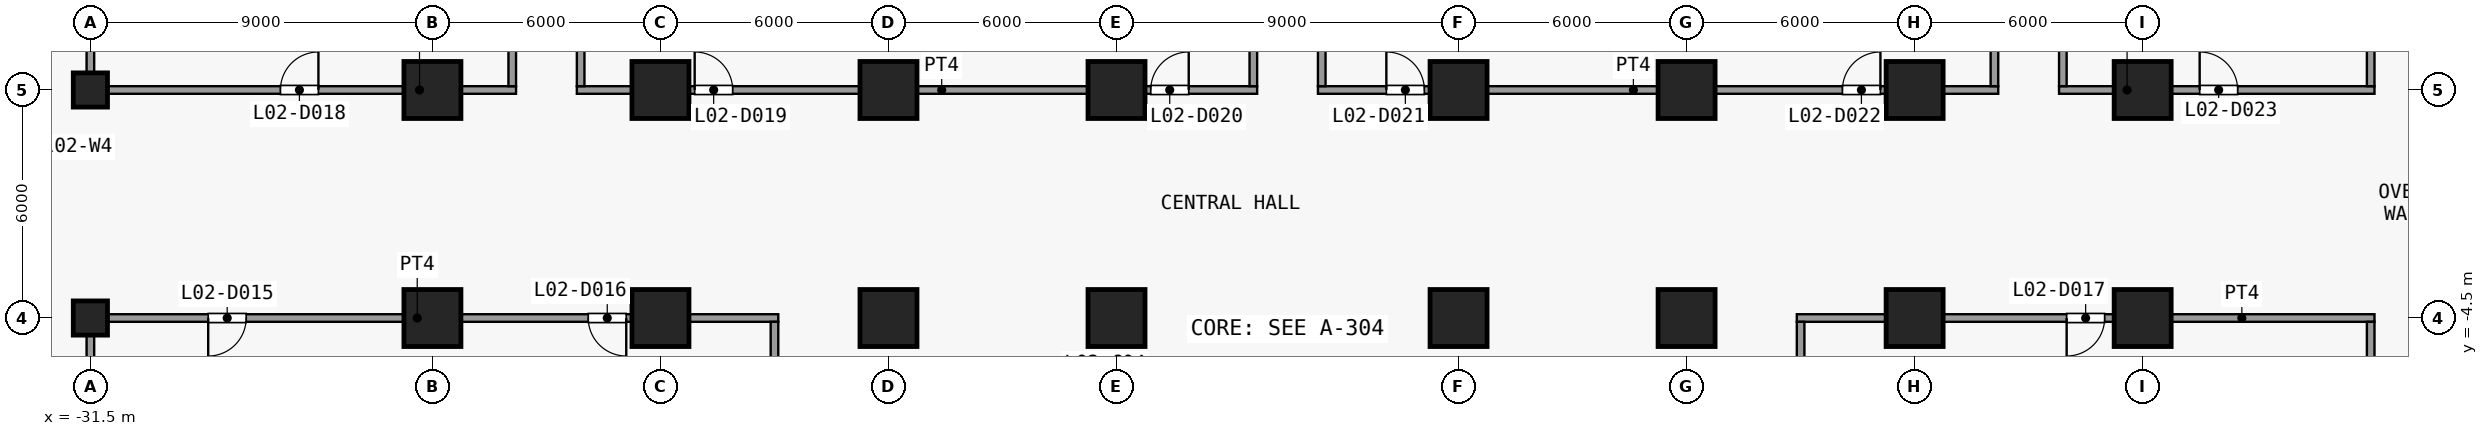
"""IFC4 building model, lengths in metres.
Left out: names, types, materials, properties, quantities, classifications, styles, units other than length and angle.
Written with IfcOpenShell. Run it as: python <this file> out.ifc"""

import sys

from ifc_helpers import new_model, si_unit, direction, frame, frame_2d, origin, origin_2d, place, context, subcontext, project, spatial, rectangle, extrude, element, fill, save


model = new_model("IFC4")
c1 = context("Model", 3, precision=1e-05, world=origin(), true_north=direction((0.0, 1.0)))
c2 = subcontext(c1, "Body", "Model", "MODEL_VIEW")
j1 = project(units=[si_unit("LENGTHUNIT", "METRE"), si_unit("PLANEANGLEUNIT", "RADIAN")], contexts=[c1])
p1 = place(None, origin())
s1 = spatial("IfcSite", under=j1, at=p1, CompositionType="ELEMENT")
p2 = place(p1, origin())
s2 = spatial("IfcBuilding", under=s1, at=p2, CompositionType="ELEMENT")
p3 = place(p2, frame((0.0, 0.0, 13.5)))
s3 = spatial("IfcBuildingStorey", under=s2, at=p3, CompositionType="ELEMENT", Elevation=13.5)
for number, where, z_axis, x_axis in (
    (1, (-31.5, -4.5, 0.0), (0.0, 0.0, 1.0), (1.0, 0.0, 0.0)),
    (2, (-31.5, 1.5, 0.0), (0.0, 0.0, 1.0), (1.0, 0.0, 0.0)),
):
    element("IfcColumn", number, at=place(p3, frame(where, z_axis=z_axis, x_axis=x_axis)), inside=s3, PredefinedType="COLUMN", context=c2, shape_type="SweptSolid", body=[
        extrude(rectangle(XDim=0.9, YDim=0.9, at=origin_2d()), origin(), (0.0, 0.0, 1.0), 5.0),
    ])
for number, where, z_axis, x_axis in (
    (3, (-22.5, -4.5, 0.0), (0.0, 0.0, 1.0), (1.0, 0.0, 0.0)),
    (4, (-22.5, 1.5, 0.0), (0.0, 0.0, 1.0), (1.0, 0.0, 0.0)),
    (5, (-16.5, -4.5, 0.0), (0.0, 0.0, 1.0), (1.0, 0.0, 0.0)),
    (6, (-16.5, 1.5, 0.0), (0.0, 0.0, 1.0), (1.0, 0.0, 0.0)),
    (7, (-10.5, -4.5, 0.0), (0.0, 0.0, 1.0), (1.0, 0.0, 0.0)),
    (8, (-10.5, 1.5, 0.0), (0.0, 0.0, 1.0), (1.0, 0.0, 0.0)),
    (9, (-4.5, -4.5, 0.0), (0.0, 0.0, 1.0), (1.0, 0.0, 0.0)),
    (10, (-4.5, 1.5, 0.0), (0.0, 0.0, 1.0), (1.0, 0.0, 0.0)),
    (11, (4.5, -4.5, 0.0), (0.0, 0.0, 1.0), (1.0, 0.0, 0.0)),
    (12, (4.5, 1.5, 0.0), (0.0, 0.0, 1.0), (1.0, 0.0, 0.0)),
    (13, (10.5, -4.5, 0.0), (0.0, 0.0, 1.0), (1.0, 0.0, 0.0)),
    (14, (10.5, 1.5, 0.0), (0.0, 0.0, 1.0), (1.0, 0.0, 0.0)),
    (15, (16.5, -4.5, 0.0), (0.0, 0.0, 1.0), (1.0, 0.0, 0.0)),
    (16, (16.5, 1.5, 0.0), (0.0, 0.0, 1.0), (1.0, 0.0, 0.0)),
    (17, (22.5, -4.5, 0.0), (0.0, 0.0, 1.0), (1.0, 0.0, 0.0)),
    (18, (22.5, 1.5, 0.0), (0.0, 0.0, 1.0), (1.0, 0.0, 0.0)),
):
    element("IfcColumn", number, at=place(p3, frame(where, z_axis=z_axis, x_axis=x_axis)), inside=s3, PredefinedType="COLUMN", context=c2, shape_type="SweptSolid", body=[
        extrude(rectangle(XDim=1.5, YDim=1.5, at=origin_2d()), origin(), (0.0, 0.0, 1.0), 5.0),
    ])
p4 = place(p3, frame((-31.6, -4.5, 0.0), z_axis=(0.0, 0.0, 1.0), x_axis=(1.0, 0.0, 0.0)))
e19 = element("IfcWall", 19, at=p4, inside=s3, PredefinedType="PARTITIONING", context=c2, shape_type="SweptSolid", body=[
    extrude(rectangle(XDim=18.2, YDim=0.2, at=frame_2d((9.1, 0.0))), origin(), (0.0, 0.0, 1.0), 4.65),
])
p5 = place(p4, frame((3.2, 0.0, 0.0)))
e20 = element("IfcOpeningElement", 20, at=p5, cuts=e19, PredefinedType="OPENING", context=c2, shape_type="SweptSolid", body=[
    extrude(rectangle(XDim=1.0, YDim=2.1, at=frame_2d((0.5, 1.05))), frame((0.0, 0.11, 0.0), z_axis=(0.0, -1.0, 0.0), x_axis=(1.0, 0.0, 0.0)), (0.0, 0.0, 1.0), 0.22),
])
p6 = place(p4, frame((13.2, 0.0, 0.0)))
e21 = element("IfcOpeningElement", 21, at=p6, cuts=e19, PredefinedType="OPENING", context=c2, shape_type="SweptSolid", body=[
    extrude(rectangle(XDim=1.0, YDim=2.1, at=frame_2d((0.5, 1.05))), frame((0.0, 0.11, 0.0), z_axis=(0.0, -1.0, 0.0), x_axis=(1.0, 0.0, 0.0)), (0.0, 0.0, 1.0), 0.22),
])
p7 = place(p3, frame((13.4, -4.5, 0.0), z_axis=(0.0, 0.0, 1.0), x_axis=(1.0, 0.0, 0.0)))
e22 = element("IfcWall", 22, at=p7, inside=s3, PredefinedType="PARTITIONING", context=c2, shape_type="SweptSolid", body=[
    extrude(rectangle(XDim=15.2, YDim=0.2, at=frame_2d((7.6, 0.0))), origin(), (0.0, 0.0, 1.0), 4.65),
])
p8 = place(p7, frame((7.1, 0.0, 0.0)))
e23 = element("IfcOpeningElement", 23, at=p8, cuts=e22, PredefinedType="OPENING", context=c2, shape_type="SweptSolid", body=[
    extrude(rectangle(XDim=1.0, YDim=2.1, at=frame_2d((0.5, 1.05))), frame((0.0, 0.11, 0.0), z_axis=(0.0, -1.0, 0.0), x_axis=(1.0, 0.0, 0.0)), (0.0, 0.0, 1.0), 0.22),
])
p9 = place(p3, frame((-31.6, 1.5, 0.0), z_axis=(0.0, 0.0, 1.0), x_axis=(1.0, 0.0, 0.0)))
e24 = element("IfcWall", 24, at=p9, inside=s3, PredefinedType="PARTITIONING", context=c2, shape_type="SweptSolid", body=[
    extrude(rectangle(XDim=11.3, YDim=0.2, at=frame_2d((5.65, 0.0))), origin(), (0.0, 0.0, 1.0), 4.65),
])
p10 = place(p9, frame((5.1, 0.0, 0.0)))
e25 = element("IfcOpeningElement", 25, at=p10, cuts=e24, PredefinedType="OPENING", context=c2, shape_type="SweptSolid", body=[
    extrude(rectangle(XDim=1.0, YDim=2.1, at=frame_2d((0.5, 1.05))), frame((0.0, 0.11, 0.0), z_axis=(0.0, -1.0, 0.0), x_axis=(1.0, 0.0, 0.0)), (0.0, 0.0, 1.0), 0.22),
])
p11 = place(p3, frame((-18.7, 1.5, 0.0), z_axis=(0.0, 0.0, 1.0), x_axis=(1.0, 0.0, 0.0)))
e26 = element("IfcWall", 26, at=p11, inside=s3, PredefinedType="PARTITIONING", context=c2, shape_type="SweptSolid", body=[
    extrude(rectangle(XDim=17.9, YDim=0.2, at=frame_2d((8.95, 0.0))), origin(), (0.0, 0.0, 1.0), 4.65),
])
p12 = place(p11, frame((3.1, 0.0, 0.0)))
e27 = element("IfcOpeningElement", 27, at=p12, cuts=e26, PredefinedType="OPENING", context=c2, shape_type="SweptSolid", body=[
    extrude(rectangle(XDim=1.0, YDim=2.1, at=frame_2d((0.5, 1.05))), frame((0.0, 0.11, 0.0), z_axis=(0.0, -1.0, 0.0), x_axis=(1.0, 0.0, 0.0)), (0.0, 0.0, 1.0), 0.22),
])
p13 = place(p11, frame((15.1, 0.0, 0.0)))
e28 = element("IfcOpeningElement", 28, at=p13, cuts=e26, PredefinedType="OPENING", context=c2, shape_type="SweptSolid", body=[
    extrude(rectangle(XDim=1.0, YDim=2.1, at=frame_2d((0.5, 1.05))), frame((0.0, 0.11, 0.0), z_axis=(0.0, -1.0, 0.0), x_axis=(1.0, 0.0, 0.0)), (0.0, 0.0, 1.0), 0.22),
])
p14 = place(p3, frame((0.8, 1.5, 0.0), z_axis=(0.0, 0.0, 1.0), x_axis=(1.0, 0.0, 0.0)))
e29 = element("IfcWall", 29, at=p14, inside=s3, PredefinedType="PARTITIONING", context=c2, shape_type="SweptSolid", body=[
    extrude(rectangle(XDim=17.9, YDim=0.2, at=frame_2d((8.95, 0.0))), origin(), (0.0, 0.0, 1.0), 4.65),
])
p15 = place(p14, frame((1.8, 0.0, 0.0)))
e30 = element("IfcOpeningElement", 30, at=p15, cuts=e29, PredefinedType="OPENING", context=c2, shape_type="SweptSolid", body=[
    extrude(rectangle(XDim=1.0, YDim=2.1, at=frame_2d((0.5, 1.05))), frame((0.0, 0.11, 0.0), z_axis=(0.0, -1.0, 0.0), x_axis=(1.0, 0.0, 0.0)), (0.0, 0.0, 1.0), 0.22),
])
p16 = place(p14, frame((13.8, 0.0, 0.0)))
e31 = element("IfcOpeningElement", 31, at=p16, cuts=e29, PredefinedType="OPENING", context=c2, shape_type="SweptSolid", body=[
    extrude(rectangle(XDim=1.0, YDim=2.1, at=frame_2d((0.5, 1.05))), frame((0.0, 0.11, 0.0), z_axis=(0.0, -1.0, 0.0), x_axis=(1.0, 0.0, 0.0)), (0.0, 0.0, 1.0), 0.22),
])
p17 = place(p3, frame((20.3, 1.5, 0.0), z_axis=(0.0, 0.0, 1.0), x_axis=(1.0, 0.0, 0.0)))
e32 = element("IfcWall", 32, at=p17, inside=s3, PredefinedType="PARTITIONING", context=c2, shape_type="SweptSolid", body=[
    extrude(rectangle(XDim=8.3, YDim=0.2, at=frame_2d((4.15, 0.0))), origin(), (0.0, 0.0, 1.0), 4.65),
])
p18 = place(p17, frame((3.7, 0.0, 0.0)))
e33 = element("IfcOpeningElement", 33, at=p18, cuts=e32, PredefinedType="OPENING", context=c2, shape_type="SweptSolid", body=[
    extrude(rectangle(XDim=1.0, YDim=2.1, at=frame_2d((0.5, 1.05))), frame((0.0, 0.11, 0.0), z_axis=(0.0, -1.0, 0.0), x_axis=(1.0, 0.0, 0.0)), (0.0, 0.0, 1.0), 0.22),
])
p19 = place(p3, frame((-31.5, -19.4, 0.0), z_axis=(0.0, 0.0, 1.0), x_axis=(0.0, 1.0, 0.0)))
e34 = element("IfcWall", 34, at=p19, inside=s3, PredefinedType="PARTITIONING", context=c2, shape_type="SweptSolid", body=[
    extrude(rectangle(XDim=14.8, YDim=0.2, at=frame_2d((7.4, 0.0))), origin(), (0.0, 0.0, 1.0), 4.65),
])
for number, where, z_axis, x_axis in (
    (35, (-31.5, 1.6, 0.0), (0.0, 0.0, 1.0), (0.0, 1.0, 0.0)),
    (36, (-20.4, 1.6, 0.0), (0.0, 0.0, 1.0), (0.0, 1.0, 0.0)),
    (37, (-18.6, 1.6, 0.0), (0.0, 0.0, 1.0), (0.0, 1.0, 0.0)),
):
    element("IfcWall", number, at=place(p3, frame(where, z_axis=z_axis, x_axis=x_axis)), inside=s3, PredefinedType="PARTITIONING", context=c2, shape_type="SweptSolid", body=[
        extrude(rectangle(XDim=11.8, YDim=0.2, at=frame_2d((5.9, 0.0))), origin(), (0.0, 0.0, 1.0), 4.65),
    ])
p20 = place(p3, frame((-13.5, -7.9, 0.0), z_axis=(0.0, 0.0, 1.0), x_axis=(0.0, 1.0, 0.0)))
e38 = element("IfcWall", 38, at=p20, inside=s3, PredefinedType="PARTITIONING", context=c2, shape_type="SweptSolid", body=[
    extrude(rectangle(XDim=3.3, YDim=0.2, at=frame_2d((1.65, 0.0))), origin(), (0.0, 0.0, 1.0), 4.65),
])
for number, where, z_axis, x_axis in (
    (39, (-0.9, 1.6, 0.0), (0.0, 0.0, 1.0), (0.0, 1.0, 0.0)),
    (40, (0.9, 1.6, 0.0), (0.0, 0.0, 1.0), (0.0, 1.0, 0.0)),
):
    element("IfcWall", number, at=place(p3, frame(where, z_axis=z_axis, x_axis=x_axis)), inside=s3, PredefinedType="PARTITIONING", context=c2, shape_type="SweptSolid", body=[
        extrude(rectangle(XDim=11.8, YDim=0.2, at=frame_2d((5.9, 0.0))), origin(), (0.0, 0.0, 1.0), 4.65),
    ])
p21 = place(p3, frame((13.5, -7.9, 0.0), z_axis=(0.0, 0.0, 1.0), x_axis=(0.0, 1.0, 0.0)))
e41 = element("IfcWall", 41, at=p21, inside=s3, PredefinedType="PARTITIONING", context=c2, shape_type="SweptSolid", body=[
    extrude(rectangle(XDim=3.3, YDim=0.2, at=frame_2d((1.65, 0.0))), origin(), (0.0, 0.0, 1.0), 4.65),
])
for number, where, z_axis, x_axis in (
    (42, (18.6, 1.6, 0.0), (0.0, 0.0, 1.0), (0.0, 1.0, 0.0)),
    (43, (20.4, 1.6, 0.0), (0.0, 0.0, 1.0), (0.0, 1.0, 0.0)),
):
    element("IfcWall", number, at=place(p3, frame(where, z_axis=z_axis, x_axis=x_axis)), inside=s3, PredefinedType="PARTITIONING", context=c2, shape_type="SweptSolid", body=[
        extrude(rectangle(XDim=11.8, YDim=0.2, at=frame_2d((5.9, 0.0))), origin(), (0.0, 0.0, 1.0), 4.65),
    ])
p22 = place(p3, frame((28.5, -19.4, 0.0), z_axis=(0.0, 0.0, 1.0), x_axis=(0.0, 1.0, 0.0)))
e44 = element("IfcWall", 44, at=p22, inside=s3, PredefinedType="PARTITIONING", context=c2, shape_type="SweptSolid", body=[
    extrude(rectangle(XDim=14.8, YDim=0.2, at=frame_2d((7.4, 0.0))), origin(), (0.0, 0.0, 1.0), 4.65),
])
p23 = place(p3, frame((28.5, 1.6, 0.0), z_axis=(0.0, 0.0, 1.0), x_axis=(0.0, 1.0, 0.0)))
e45 = element("IfcWall", 45, at=p23, inside=s3, PredefinedType="PARTITIONING", context=c2, shape_type="SweptSolid", body=[
    extrude(rectangle(XDim=11.8, YDim=0.2, at=frame_2d((5.9, 0.0))), origin(), (0.0, 0.0, 1.0), 4.65),
])
p24 = place(p5, origin())
e46 = element("IfcDoor", 46, at=p24, inside=s3, OperationType="SINGLE_SWING_LEFT", PredefinedType="DOOR", context=c2, shape_type="SweptSolid", body=[
    extrude(rectangle(XDim=1.0, YDim=2.1, at=frame_2d((0.5, 1.05))), frame((0.0, 0.025, 0.0), z_axis=(0.0, -1.0, 0.0), x_axis=(1.0, 0.0, 0.0)), (0.0, 0.0, 1.0), 0.05),
])
fill(e20, e46)
p25 = place(p6, origin())
e47 = element("IfcDoor", 47, at=p25, inside=s3, OperationType="SINGLE_SWING_RIGHT", PredefinedType="DOOR", context=c2, shape_type="SweptSolid", body=[
    extrude(rectangle(XDim=1.0, YDim=2.1, at=frame_2d((0.5, 1.05))), frame((0.0, 0.025, 0.0), z_axis=(0.0, -1.0, 0.0), x_axis=(1.0, 0.0, 0.0)), (0.0, 0.0, 1.0), 0.05),
])
fill(e21, e47)
p26 = place(p8, origin())
e48 = element("IfcDoor", 48, at=p26, inside=s3, OperationType="SINGLE_SWING_LEFT", PredefinedType="DOOR", context=c2, shape_type="SweptSolid", body=[
    extrude(rectangle(XDim=1.0, YDim=2.1, at=frame_2d((0.5, 1.05))), frame((0.0, 0.025, 0.0), z_axis=(0.0, -1.0, 0.0), x_axis=(1.0, 0.0, 0.0)), (0.0, 0.0, 1.0), 0.05),
])
fill(e23, e48)
p27 = place(p10, origin())
e49 = element("IfcDoor", 49, at=p27, inside=s3, OperationType="SINGLE_SWING_LEFT", PredefinedType="DOOR", context=c2, shape_type="SweptSolid", body=[
    extrude(rectangle(XDim=1.0, YDim=2.1, at=frame_2d((0.5, 1.05))), frame((0.0, 0.025, 0.0), z_axis=(0.0, -1.0, 0.0), x_axis=(1.0, 0.0, 0.0)), (0.0, 0.0, 1.0), 0.05),
])
fill(e25, e49)
p28 = place(p12, origin())
e50 = element("IfcDoor", 50, at=p28, inside=s3, OperationType="SINGLE_SWING_RIGHT", PredefinedType="DOOR", context=c2, shape_type="SweptSolid", body=[
    extrude(rectangle(XDim=1.0, YDim=2.1, at=frame_2d((0.5, 1.05))), frame((0.0, 0.025, 0.0), z_axis=(0.0, -1.0, 0.0), x_axis=(1.0, 0.0, 0.0)), (0.0, 0.0, 1.0), 0.05),
])
fill(e27, e50)
p29 = place(p13, origin())
e51 = element("IfcDoor", 51, at=p29, inside=s3, OperationType="SINGLE_SWING_LEFT", PredefinedType="DOOR", context=c2, shape_type="SweptSolid", body=[
    extrude(rectangle(XDim=1.0, YDim=2.1, at=frame_2d((0.5, 1.05))), frame((0.0, 0.025, 0.0), z_axis=(0.0, -1.0, 0.0), x_axis=(1.0, 0.0, 0.0)), (0.0, 0.0, 1.0), 0.05),
])
fill(e28, e51)
p30 = place(p15, origin())
e52 = element("IfcDoor", 52, at=p30, inside=s3, OperationType="SINGLE_SWING_RIGHT", PredefinedType="DOOR", context=c2, shape_type="SweptSolid", body=[
    extrude(rectangle(XDim=1.0, YDim=2.1, at=frame_2d((0.5, 1.05))), frame((0.0, 0.025, 0.0), z_axis=(0.0, -1.0, 0.0), x_axis=(1.0, 0.0, 0.0)), (0.0, 0.0, 1.0), 0.05),
])
fill(e30, e52)
p31 = place(p16, origin())
e53 = element("IfcDoor", 53, at=p31, inside=s3, OperationType="SINGLE_SWING_LEFT", PredefinedType="DOOR", context=c2, shape_type="SweptSolid", body=[
    extrude(rectangle(XDim=1.0, YDim=2.1, at=frame_2d((0.5, 1.05))), frame((0.0, 0.025, 0.0), z_axis=(0.0, -1.0, 0.0), x_axis=(1.0, 0.0, 0.0)), (0.0, 0.0, 1.0), 0.05),
])
fill(e31, e53)
p32 = place(p18, origin())
e54 = element("IfcDoor", 54, at=p32, inside=s3, OperationType="SINGLE_SWING_RIGHT", PredefinedType="DOOR", context=c2, shape_type="SweptSolid", body=[
    extrude(rectangle(XDim=1.0, YDim=2.1, at=frame_2d((0.5, 1.05))), frame((0.0, 0.025, 0.0), z_axis=(0.0, -1.0, 0.0), x_axis=(1.0, 0.0, 0.0)), (0.0, 0.0, 1.0), 0.05),
])
fill(e33, e54)
save(model, sys.argv[1])
